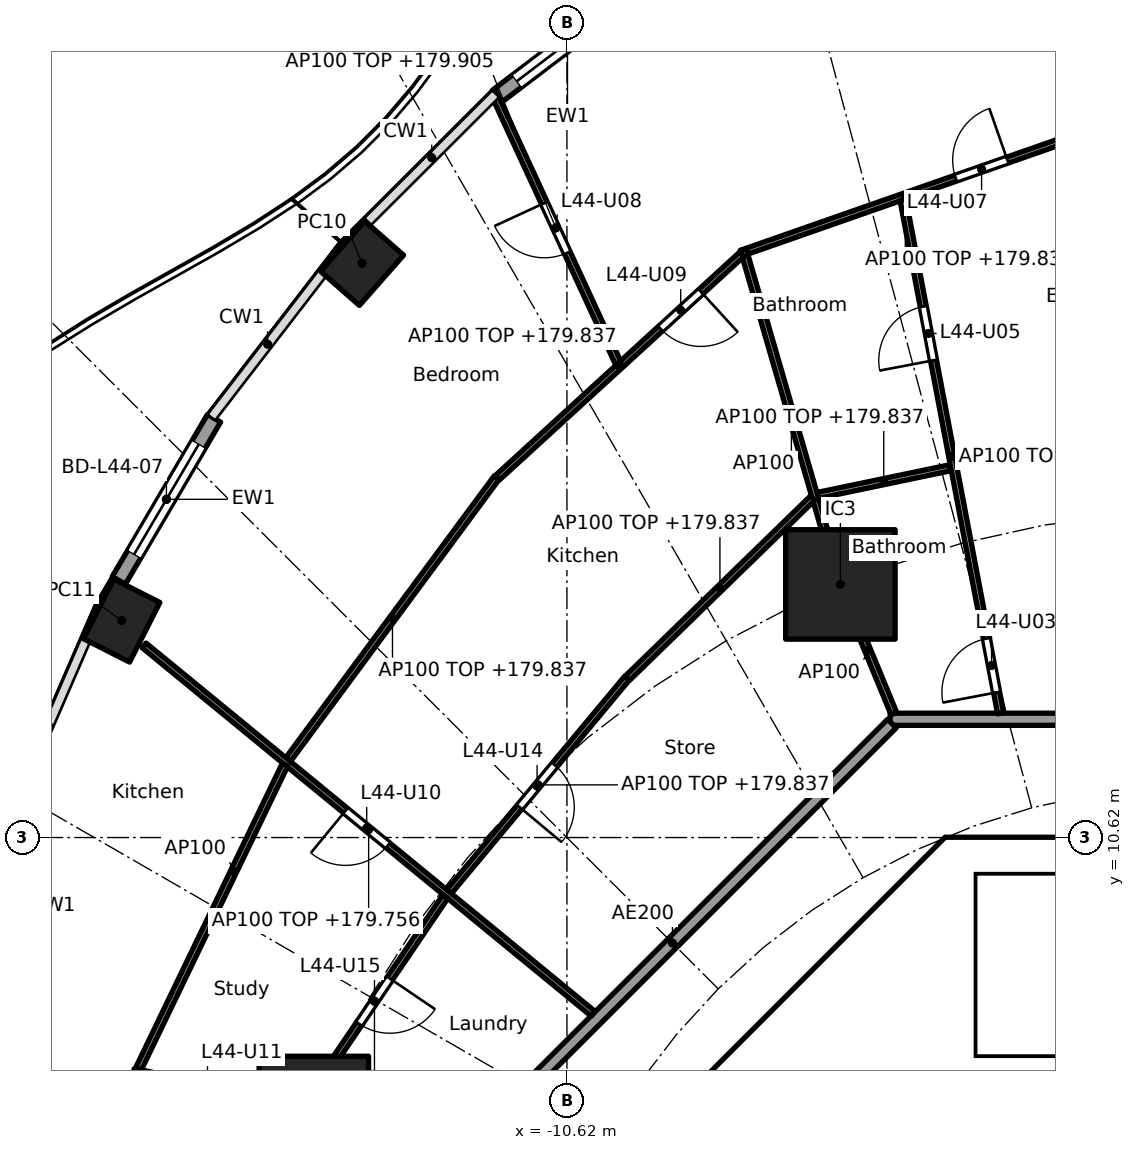
"""IFC4 building model, lengths in metres.
Left out: names, types, materials, properties, quantities, classifications, styles, units other than length and angle.
Written with IfcOpenShell. Run it as: python <this file> out.ifc"""

import sys

from ifc_helpers import new_model, si_unit, direction, frame, frame_2d, origin, origin_2d, place, context, subcontext, project, spatial, polyline, rectangle, hollow_rectangle, outline, extrude, element, fill, save


model = new_model("IFC4")
c1 = context("Model", 3, precision=1e-05, world=origin(), true_north=direction((0.0, 1.0)))
c2 = subcontext(c1, "Body", "Model", "MODEL_VIEW")
j1 = project(units=[si_unit("LENGTHUNIT", "METRE"), si_unit("PLANEANGLEUNIT", "RADIAN")], contexts=[c1])
p1 = place(None, origin())
s1 = spatial("IfcSite", under=j1, at=p1, CompositionType="ELEMENT")
p2 = place(p1, origin())
s2 = spatial("IfcBuilding", under=s1, at=p2, CompositionType="ELEMENT")
p3 = place(p2, frame((0.0, 0.0, 177.0)))
s3 = spatial("IfcBuildingStorey", under=s2, at=p3, CompositionType="ELEMENT", Elevation=177.0)
for number, where, z_axis, x_axis in (
    (1, (-13.989, 20.064, 0.0), (0.0, 0.0, 1.0), (-0.66, -0.751, 0.0)),
    (2, (-17.942, 14.188, 0.0), (0.0, 0.0, 1.0), (-0.452, -0.892, 0.0)),
):
    element("IfcColumn", number, at=place(p3, frame(where, z_axis=z_axis, x_axis=x_axis)), inside=s3, PredefinedType="COLUMN", context=c2, shape_type="SweptSolid", body=[
        extrude(hollow_rectangle(XDim=1.1, YDim=0.85, WallThickness=0.036, at=origin_2d()), origin(), (0.0, 0.0, 1.0), 3.7),
    ])
for number, where, z_axis, x_axis in (
    (3, (-6.123, 14.782, 0.0), (0.0, 0.0, 1.0), (1.0, 0.0, 0.0)),
    (4, (-14.782, 6.123, 0.0), (0.0, 0.0, 1.0), (1.0, 0.0, 0.0)),
):
    element("IfcColumn", number, at=place(p3, frame(where, z_axis=z_axis, x_axis=x_axis)), inside=s3, PredefinedType="COLUMN", context=c2, shape_type="SweptSolid", body=[
        extrude(rectangle(XDim=1.8, YDim=1.8, at=origin_2d()), origin(), (0.0, 0.0, 1.0), 3.7),
    ])
p4 = place(p3, frame((-11.772, 22.809, 0.0), z_axis=(0.0, 0.0, 1.0), x_axis=(0.796055733703, 0.60522332146, 0.0)))
e5 = element("IfcWall", 5, at=p4, inside=s3, PredefinedType="SOLIDWALL", context=c2, shape_type="SweptSolid", body=[
    extrude(rectangle(XDim=2.917, YDim=0.25, at=frame_2d((1.458, 0.0))), origin(), (0.0, 0.0, 1.0), 3.44),
])
p5 = place(p4, frame((0.408, 0.0, 0.0)))
e6 = element("IfcOpeningElement", 6, at=p5, cuts=e5, PredefinedType="OPENING", context=c2, shape_type="SweptSolid", body=[
    extrude(rectangle(XDim=2.1, YDim=2.4, at=frame_2d((1.05, 1.2))), frame((0.0, 0.135, 0.0), z_axis=(0.0, -1.0, 0.0), x_axis=(1.0, 0.0, 0.0)), (0.0, 0.0, 1.0), 0.27),
])
p6 = place(p3, frame((-17.989, 14.848, 0.0), z_axis=(0.0, 0.0, 1.0), x_axis=(0.506309086483, 0.862352079458, 0.0)))
e7 = element("IfcWall", 7, at=p6, inside=s3, PredefinedType="SOLIDWALL", context=c2, shape_type="SweptSolid", body=[
    extrude(rectangle(XDim=3.092, YDim=0.25, at=frame_2d((1.546, 0.0))), origin(), (0.0, 0.0, 1.0), 3.44),
])
p7 = place(p6, frame((0.496, 0.0, 0.0)))
e8 = element("IfcOpeningElement", 8, at=p7, cuts=e7, PredefinedType="OPENING", context=c2, shape_type="SweptSolid", body=[
    extrude(rectangle(XDim=2.1, YDim=2.4, at=frame_2d((1.05, 1.2))), frame((0.0, 0.135, 0.0), z_axis=(0.0, -1.0, 0.0), x_axis=(1.0, 0.0, 0.0)), (0.0, 0.0, 1.0), 0.27),
])
p8 = place(p3, frame((-4.613, 9.988, 0.0), z_axis=(0.0, 0.0, 1.0), x_axis=(-0.707106781187, -0.707106781187, 0.0)))
e9 = element("IfcWall", 9, at=p8, inside=s3, PredefinedType="SHEAR", context=c2, shape_type="SweptSolid", body=[
    extrude(rectangle(XDim=7.602, YDim=0.6, at=frame_2d((3.801, 0.0))), origin(), (0.0, 0.0, 1.0), 3.44),
])
p9 = place(p8, frame((0.351, 0.0, 0.0)))
e10 = element("IfcOpeningElement", 10, at=p9, cuts=e9, PredefinedType="OPENING", context=c2, shape_type="SweptSolid", body=[
    extrude(rectangle(XDim=1.1, YDim=2.1, at=frame_2d((0.55, 1.05))), frame((0.0, 0.31, 0.0), z_axis=(0.0, -1.0, 0.0), x_axis=(1.0, 0.0, 0.0)), (0.0, 0.0, 1.0), 0.62),
])
p10 = place(p3, frame((-5.8, 4.3, 0.0), z_axis=(0.0, 0.0, 1.0), x_axis=(0.0, 1.0, 0.0)))
e11 = element("IfcWall", 11, at=p10, inside=s3, PredefinedType="PARTITIONING", context=c2, shape_type="SweptSolid", body=[
    extrude(rectangle(XDim=3.927, YDim=0.15, at=frame_2d((1.963, 0.0))), origin(), (0.0, 0.0, 1.0), 3.44),
])
p11 = place(p10, frame((0.413, 0.0, 0.0)))
e12 = element("IfcOpeningElement", 12, at=p11, cuts=e11, PredefinedType="OPENING", context=c2, shape_type="SweptSolid", body=[
    extrude(rectangle(XDim=0.9, YDim=2.1, at=frame_2d((0.45, 1.05))), frame((0.0, 0.085, 0.0), z_axis=(0.0, -1.0, 0.0), x_axis=(1.0, 0.0, 0.0)), (0.0, 0.0, 1.0), 0.17),
])
p12 = place(p10, frame((2.489, 0.0, 0.0)))
e13 = element("IfcOpeningElement", 13, at=p12, cuts=e11, PredefinedType="OPENING", context=c2, shape_type="SweptSolid", body=[
    extrude(rectangle(XDim=0.9, YDim=2.1, at=frame_2d((0.45, 1.05))), frame((0.0, 0.085, 0.0), z_axis=(0.0, -1.0, 0.0), x_axis=(1.0, 0.0, 0.0)), (0.0, 0.0, 1.0), 0.17),
])
p13 = place(p3, origin())
e14 = element("IfcWall", 14, at=p13, inside=s3, PredefinedType="SHEAR", context=c2, shape_type="SweptSolid", body=[
    extrude(outline(polyline([(-4.152, 10.025), (-4.401, 9.776), (-4.825, 10.2), (-4.401, 10.625), (4.401, 10.625), (4.825, 10.2), (4.401, 9.776), (4.152, 10.025), (-4.152, 10.025)])), origin(), (0.0, 0.0, 1.0), 3.44),
])
p14 = place(p3, origin())
e15 = element("IfcWall", 15, at=p14, inside=s3, PredefinedType="SOLIDWALL", context=c2, shape_type="SweptSolid", body=[
    extrude(outline(polyline([(-3.9, 7.025), (-4.1, 7.025), (-4.1, 10.025), (-3.9, 10.025), (-3.9, 7.025)])), origin(), (0.0, 0.0, 1.0), 3.44),
])
p15 = place(p3, origin())
e16 = element("IfcWall", 16, at=p15, inside=s3, PredefinedType="SOLIDWALL", context=c2, shape_type="SweptSolid", body=[
    extrude(outline(polyline([(4.1, 6.5), (-4.1, 6.5), (-4.1, 7.025), (4.1, 7.025), (4.1, 6.5)])), origin(), (0.0, 0.0, 1.0), 3.44),
])
p16 = place(p3, frame((5.104, 12.565, 0.0), z_axis=(0.0, 0.0, 1.0), x_axis=(-1.0, 0.0, 0.0)))
e17 = element("IfcWall", 17, at=p16, inside=s3, PredefinedType="PARTITIONING", context=c2, shape_type="SweptSolid", body=[
    extrude(rectangle(XDim=10.409, YDim=0.2, at=frame_2d((5.205, 0.0))), origin(), (0.0, 0.0, 1.0), 3.44),
])
p17 = place(p16, frame((6.339, 0.0, 0.0)))
e18 = element("IfcOpeningElement", 18, at=p17, cuts=e17, PredefinedType="OPENING", context=c2, shape_type="SweptSolid", body=[
    extrude(rectangle(XDim=1.0, YDim=2.1, at=frame_2d((0.5, 1.05))), frame((0.0, 0.11, 0.0), z_axis=(0.0, -1.0, 0.0), x_axis=(1.0, 0.0, 0.0)), (0.0, 0.0, 1.0), 0.22),
])
p18 = place(p3, frame((-5.275, 12.494, 0.0), z_axis=(0.0, 0.0, 1.0), x_axis=(-0.707106781187, -0.707106781187, 0.0)))
e19 = element("IfcWall", 19, at=p18, inside=s3, PredefinedType="PARTITIONING", context=c2, shape_type="SweptSolid", body=[
    extrude(rectangle(XDim=10.209, YDim=0.2, at=frame_2d((5.104, 0.0))), origin(), (0.0, 0.0, 1.0), 3.44),
])
p19 = place(p3, frame((-2.452, 22.083, 0.0), z_axis=(0.0, 0.0, 1.0), x_axis=(-0.943916289103, -0.330184856051, 0.0)))
e20 = element("IfcWall", 20, at=p19, inside=s3, PredefinedType="PARTITIONING", context=c2, shape_type="SweptSolid", body=[
    extrude(rectangle(XDim=5.517, YDim=0.1, at=frame_2d((2.759, 0.0))), origin(), (0.0, 0.0, 1.0), 2.837),
])
p20 = place(p19, frame((0.979, 0.0, 0.0)))
e21 = element("IfcOpeningElement", 21, at=p20, cuts=e20, PredefinedType="OPENING", context=c2, shape_type="SweptSolid", body=[
    extrude(rectangle(XDim=0.9, YDim=2.1, at=frame_2d((0.45, 1.05))), frame((0.0, 0.06, 0.0), z_axis=(0.0, -1.0, 0.0), x_axis=(1.0, 0.0, 0.0)), (0.0, 0.0, 1.0), 0.12),
])
p21 = place(p3, frame((-3.488, 12.663, 0.0), z_axis=(0.0, 0.0, 1.0), x_axis=(-0.186783185485, 0.982401161247, 0.0)))
e22 = element("IfcWall", 22, at=p21, inside=s3, PredefinedType="PARTITIONING", context=c2, shape_type="SweptSolid", body=[
    extrude(rectangle(XDim=8.595, YDim=0.1, at=frame_2d((4.298, 0.0))), origin(), (0.0, 0.0, 1.0), 2.756),
])
p22 = place(p21, frame((0.35, 0.0, 0.0)))
e23 = element("IfcOpeningElement", 23, at=p22, cuts=e22, PredefinedType="OPENING", context=c2, shape_type="SweptSolid", body=[
    extrude(rectangle(XDim=0.9, YDim=2.1, at=frame_2d((0.45, 1.05))), frame((0.0, 0.06, 0.0), z_axis=(0.0, -1.0, 0.0), x_axis=(1.0, 0.0, 0.0)), (0.0, 0.0, 1.0), 0.12),
])
p23 = place(p21, frame((5.908, 0.0, 0.0)))
e24 = element("IfcOpeningElement", 24, at=p23, cuts=e22, PredefinedType="OPENING", context=c2, shape_type="SweptSolid", body=[
    extrude(rectangle(XDim=0.9, YDim=2.1, at=frame_2d((0.45, 1.05))), frame((0.0, 0.06, 0.0), z_axis=(0.0, -1.0, 0.0), x_axis=(1.0, 0.0, 0.0)), (0.0, 0.0, 1.0), 0.12),
])
p24 = place(p3, frame((-4.324, 16.699, 0.0), z_axis=(0.0, 0.0, 1.0), x_axis=(-0.978908011866, -0.204301503432, 0.0)))
e25 = element("IfcWall", 25, at=p24, inside=s3, PredefinedType="PARTITIONING", context=c2, shape_type="SweptSolid", body=[
    extrude(rectangle(XDim=2.218, YDim=0.1, at=frame_2d((1.109, 0.0))), origin(), (0.0, 0.0, 1.0), 2.837),
])
p25 = place(p3, frame((-5.243, 12.657, 0.0), z_axis=(0.0, 0.0, 1.0), x_axis=(-0.382719158442, 0.923864733477, 0.0)))
e26 = element("IfcWall", 26, at=p25, inside=s3, PredefinedType="PARTITIONING", context=c2, shape_type="SweptSolid", body=[
    extrude(rectangle(XDim=2.25, YDim=0.1, at=frame_2d((1.125, 0.0))), origin(), (0.0, 0.0, 1.0), 3.44),
])
p26 = place(p3, frame((-6.137, 14.83, 0.0), z_axis=(0.0, 0.0, 1.0), x_axis=(-0.278471793245, 0.960444407744, 0.0)))
e27 = element("IfcWall", 27, at=p26, inside=s3, PredefinedType="PARTITIONING", context=c2, shape_type="SweptSolid", body=[
    extrude(rectangle(XDim=5.688, YDim=0.1, at=frame_2d((2.844, 0.0))), origin(), (0.0, 0.0, 1.0), 3.44),
])
p27 = place(p3, frame((-6.58, 16.201, 0.0), z_axis=(0.0, 0.0, 1.0), x_axis=(-0.716946269374, -0.697128429223, 0.0)))
e28 = element("IfcWall", 28, at=p27, inside=s3, PredefinedType="PARTITIONING", context=c2, shape_type="SweptSolid", body=[
    extrude(rectangle(XDim=4.25, YDim=0.1, at=frame_2d((2.125, 0.0))), origin(), (0.0, 0.0, 1.0), 2.837),
])
p28 = place(p3, frame((-7.744, 20.212, 0.0), z_axis=(0.0, 0.0, 1.0), x_axis=(-0.738051761282, -0.674744097913, 0.0)))
e29 = element("IfcWall", 29, at=p28, inside=s3, PredefinedType="PARTITIONING", context=c2, shape_type="SweptSolid", body=[
    extrude(rectangle(XDim=5.449, YDim=0.1, at=frame_2d((2.725, 0.0))), origin(), (0.0, 0.0, 1.0), 2.837),
])
p29 = place(p28, frame((0.912, 0.0, 0.0)))
e30 = element("IfcOpeningElement", 30, at=p29, cuts=e29, PredefinedType="OPENING", context=c2, shape_type="SweptSolid", body=[
    extrude(rectangle(XDim=0.9, YDim=2.1, at=frame_2d((0.45, 1.05))), frame((0.0, 0.06, 0.0), z_axis=(0.0, -1.0, 0.0), x_axis=(1.0, 0.0, 0.0)), (0.0, 0.0, 1.0), 0.12),
])
p30 = place(p3, frame((-9.776, 18.419, 0.0), z_axis=(0.0, 0.0, 1.0), x_axis=(-0.418998197727, 0.907987065052, 0.0)))
e31 = element("IfcWall", 31, at=p30, inside=s3, PredefinedType="PARTITIONING", context=c2, shape_type="SweptSolid", body=[
    extrude(rectangle(XDim=4.904, YDim=0.1, at=frame_2d((2.452, 0.0))), origin(), (0.0, 0.0, 1.0), 2.905),
])
p31 = place(p30, frame((2.002, 0.0, 0.0)))
e32 = element("IfcOpeningElement", 32, at=p31, cuts=e31, PredefinedType="OPENING", context=c2, shape_type="SweptSolid", body=[
    extrude(rectangle(XDim=0.9, YDim=2.1, at=frame_2d((0.45, 1.05))), frame((0.0, 0.06, 0.0), z_axis=(0.0, -1.0, 0.0), x_axis=(1.0, 0.0, 0.0)), (0.0, 0.0, 1.0), 0.12),
])
p32 = place(p3, frame((-9.631, 13.242, 0.0), z_axis=(0.0, 0.0, 1.0), x_axis=(-0.640315711982, -0.768111833647, 0.0)))
e33 = element("IfcWall", 33, at=p32, inside=s3, PredefinedType="PARTITIONING", context=c2, shape_type="SweptSolid", body=[
    extrude(rectangle(XDim=4.572, YDim=0.1, at=frame_2d((2.286, 0.0))), origin(), (0.0, 0.0, 1.0), 2.837),
])
p33 = place(p32, frame((1.861, 0.0, 0.0)))
e34 = element("IfcOpeningElement", 34, at=p33, cuts=e33, PredefinedType="OPENING", context=c2, shape_type="SweptSolid", body=[
    extrude(rectangle(XDim=0.9, YDim=2.1, at=frame_2d((0.45, 1.05))), frame((0.0, 0.06, 0.0), z_axis=(0.0, -1.0, 0.0), x_axis=(1.0, 0.0, 0.0)), (0.0, 0.0, 1.0), 0.12),
])
p34 = place(p3, frame((-11.773, 16.542, 0.0), z_axis=(0.0, 0.0, 1.0), x_axis=(-0.594694305999, -0.803951915485, 0.0)))
e35 = element("IfcWall", 35, at=p34, inside=s3, PredefinedType="PARTITIONING", context=c2, shape_type="SweptSolid", body=[
    extrude(rectangle(XDim=5.772, YDim=0.1, at=frame_2d((2.886, 0.0))), origin(), (0.0, 0.0, 1.0), 2.837),
])
p35 = place(p3, frame((-10.189, 7.721, 0.0), z_axis=(0.0, 0.0, 1.0), x_axis=(-0.773134429339, 0.634242188892, 0.0)))
e36 = element("IfcWall", 36, at=p35, inside=s3, PredefinedType="PARTITIONING", context=c2, shape_type="SweptSolid", body=[
    extrude(rectangle(XDim=9.552, YDim=0.1, at=frame_2d((4.776, 0.0))), origin(), (0.0, 0.0, 1.0), 2.756),
])
p36 = place(p35, frame((4.367, 0.0, 0.0)))
e37 = element("IfcOpeningElement", 37, at=p36, cuts=e36, PredefinedType="OPENING", context=c2, shape_type="SweptSolid", body=[
    extrude(rectangle(XDim=0.9, YDim=2.1, at=frame_2d((0.45, 1.05))), frame((0.0, 0.06, 0.0), z_axis=(0.0, -1.0, 0.0), x_axis=(1.0, 0.0, 0.0)), (0.0, 0.0, 1.0), 0.12),
])
p37 = place(p3, frame((-12.619, 9.65, 0.0), z_axis=(0.0, 0.0, 1.0), x_axis=(-0.561064907171, -0.827771810308, 0.0)))
e38 = element("IfcWall", 38, at=p37, inside=s3, PredefinedType="PARTITIONING", context=c2, shape_type="SweptSolid", body=[
    extrude(rectangle(XDim=4.159, YDim=0.1, at=frame_2d((2.079, 0.0))), origin(), (0.0, 0.0, 1.0), 3.44),
])
p38 = place(p37, frame((1.629, 0.0, 0.0)))
e39 = element("IfcOpeningElement", 39, at=p38, cuts=e38, PredefinedType="OPENING", context=c2, shape_type="SweptSolid", body=[
    extrude(rectangle(XDim=0.9, YDim=2.1, at=frame_2d((0.45, 1.05))), frame((0.0, 0.06, 0.0), z_axis=(0.0, -1.0, 0.0), x_axis=(1.0, 0.0, 0.0)), (0.0, 0.0, 1.0), 0.12),
])
p39 = place(p3, frame((-15.257, 11.816, 0.0), z_axis=(0.0, 0.0, 1.0), x_axis=(-0.434040130629, -0.900893536997, 0.0)))
e40 = element("IfcWall", 40, at=p39, inside=s3, PredefinedType="PARTITIONING", context=c2, shape_type="SweptSolid", body=[
    extrude(rectangle(XDim=5.558, YDim=0.1, at=frame_2d((2.779, 0.0))), origin(), (0.0, 0.0, 1.0), 3.44),
])
p40 = place(p3, frame((-14.831, 6.134, 0.0), z_axis=(0.0, 0.0, 1.0), x_axis=(-0.976560749847, 0.215241961191, 0.0)))
e41 = element("IfcWall", 41, at=p40, inside=s3, PredefinedType="PARTITIONING", context=c2, shape_type="SweptSolid", body=[
    extrude(rectangle(XDim=2.879, YDim=0.1, at=frame_2d((1.439, 0.0))), origin(), (0.0, 0.0, 1.0), 3.44),
])
p41 = place(p40, frame((1.291, 0.0, 0.0)))
e42 = element("IfcOpeningElement", 42, at=p41, cuts=e41, PredefinedType="OPENING", context=c2, shape_type="SweptSolid", body=[
    extrude(rectangle(XDim=0.9, YDim=2.1, at=frame_2d((0.45, 1.05))), frame((0.0, 0.06, 0.0), z_axis=(0.0, -1.0, 0.0), x_axis=(1.0, 0.0, 0.0)), (0.0, 0.0, 1.0), 0.12),
])
p42 = place(p3, frame((-17.687, 6.814, 0.0), z_axis=(0.0, 0.0, 1.0), x_axis=(-0.086010249709, -0.996294252189, 0.0)))
e43 = element("IfcWall", 43, at=p42, inside=s3, PredefinedType="PARTITIONING", context=c2, shape_type="SweptSolid", body=[
    extrude(rectangle(XDim=6.889, YDim=0.1, at=frame_2d((3.445, 0.0))), origin(), (0.0, 0.0, 1.0), 2.837),
])
p43 = place(p42, frame((1.297, 0.0, 0.0)))
e44 = element("IfcOpeningElement", 44, at=p43, cuts=e43, PredefinedType="OPENING", context=c2, shape_type="SweptSolid", body=[
    extrude(rectangle(XDim=0.9, YDim=2.1, at=frame_2d((0.45, 1.05))), frame((0.0, 0.06, 0.0), z_axis=(0.0, -1.0, 0.0), x_axis=(1.0, 0.0, 0.0)), (0.0, 0.0, 1.0), 0.12),
])
p44 = place(p5, origin())
e45 = element("IfcDoor", 45, at=p44, inside=s3, OperationType="SLIDING_TO_LEFT", PredefinedType="DOOR", context=c2, shape_type="SweptSolid", body=[
    extrude(rectangle(XDim=2.1, YDim=2.4, at=frame_2d((1.05, 1.2))), frame((0.0, 0.025, 0.0), z_axis=(0.0, -1.0, 0.0), x_axis=(1.0, 0.0, 0.0)), (0.0, 0.0, 1.0), 0.05),
])
fill(e6, e45)
p45 = place(p7, origin())
e46 = element("IfcDoor", 46, at=p45, inside=s3, OperationType="SLIDING_TO_LEFT", PredefinedType="DOOR", context=c2, shape_type="SweptSolid", body=[
    extrude(rectangle(XDim=2.1, YDim=2.4, at=frame_2d((1.05, 1.2))), frame((0.0, 0.025, 0.0), z_axis=(0.0, -1.0, 0.0), x_axis=(1.0, 0.0, 0.0)), (0.0, 0.0, 1.0), 0.05),
])
fill(e8, e46)
p46 = place(p12, origin())
e47 = element("IfcDoor", 47, at=p46, inside=s3, OperationType="SINGLE_SWING_LEFT", PredefinedType="DOOR", context=c2, shape_type="SweptSolid", body=[
    extrude(rectangle(XDim=0.9, YDim=2.1, at=frame_2d((0.45, 1.05))), frame((0.0, 0.025, 0.0), z_axis=(0.0, -1.0, 0.0), x_axis=(1.0, 0.0, 0.0)), (0.0, 0.0, 1.0), 0.05),
])
fill(e13, e47)
p47 = place(p9, origin())
e48 = element("IfcDoor", 48, at=p47, inside=s3, OperationType="SINGLE_SWING_LEFT", PredefinedType="DOOR", context=c2, shape_type="SweptSolid", body=[
    extrude(rectangle(XDim=1.1, YDim=2.1, at=frame_2d((0.55, 1.05))), frame((0.0, 0.025, 0.0), z_axis=(0.0, -1.0, 0.0), x_axis=(1.0, 0.0, 0.0)), (0.0, 0.0, 1.0), 0.05),
])
fill(e10, e48)
p48 = place(p22, origin())
e49 = element("IfcDoor", 49, at=p48, inside=s3, OperationType="SINGLE_SWING_LEFT", PredefinedType="DOOR", context=c2, shape_type="SweptSolid", body=[
    extrude(rectangle(XDim=0.9, YDim=2.1, at=frame_2d((0.45, 1.05))), frame((0.0, 0.025, 0.0), z_axis=(0.0, -1.0, 0.0), x_axis=(1.0, 0.0, 0.0)), (0.0, 0.0, 1.0), 0.05),
])
fill(e23, e49)
p49 = place(p23, origin())
e50 = element("IfcDoor", 50, at=p49, inside=s3, OperationType="SINGLE_SWING_LEFT", PredefinedType="DOOR", context=c2, shape_type="SweptSolid", body=[
    extrude(rectangle(XDim=0.9, YDim=2.1, at=frame_2d((0.45, 1.05))), frame((0.0, 0.025, 0.0), z_axis=(0.0, -1.0, 0.0), x_axis=(1.0, 0.0, 0.0)), (0.0, 0.0, 1.0), 0.05),
])
fill(e24, e50)
p50 = place(p20, frame((0.9, 0.0, 0.0), x_axis=(-1.0, 0.0, 0.0)))
e51 = element("IfcDoor", 51, at=p50, inside=s3, OperationType="SINGLE_SWING_RIGHT", PredefinedType="DOOR", context=c2, shape_type="SweptSolid", body=[
    extrude(rectangle(XDim=0.9, YDim=2.1, at=frame_2d((0.45, 1.05))), frame((0.0, 0.025, 0.0), z_axis=(0.0, -1.0, 0.0), x_axis=(1.0, 0.0, 0.0)), (0.0, 0.0, 1.0), 0.05),
])
fill(e21, e51)
p51 = place(p31, origin())
e52 = element("IfcDoor", 52, at=p51, inside=s3, OperationType="SINGLE_SWING_RIGHT", PredefinedType="DOOR", context=c2, shape_type="SweptSolid", body=[
    extrude(rectangle(XDim=0.9, YDim=2.1, at=frame_2d((0.45, 1.05))), frame((0.0, 0.025, 0.0), z_axis=(0.0, -1.0, 0.0), x_axis=(1.0, 0.0, 0.0)), (0.0, 0.0, 1.0), 0.05),
])
fill(e32, e52)
p52 = place(p29, origin())
e53 = element("IfcDoor", 53, at=p52, inside=s3, OperationType="SINGLE_SWING_LEFT", PredefinedType="DOOR", context=c2, shape_type="SweptSolid", body=[
    extrude(rectangle(XDim=0.9, YDim=2.1, at=frame_2d((0.45, 1.05))), frame((0.0, 0.025, 0.0), z_axis=(0.0, -1.0, 0.0), x_axis=(1.0, 0.0, 0.0)), (0.0, 0.0, 1.0), 0.05),
])
fill(e30, e53)
p53 = place(p36, origin())
e54 = element("IfcDoor", 54, at=p53, inside=s3, OperationType="SINGLE_SWING_RIGHT", PredefinedType="DOOR", context=c2, shape_type="SweptSolid", body=[
    extrude(rectangle(XDim=0.9, YDim=2.1, at=frame_2d((0.45, 1.05))), frame((0.0, 0.025, 0.0), z_axis=(0.0, -1.0, 0.0), x_axis=(1.0, 0.0, 0.0)), (0.0, 0.0, 1.0), 0.05),
])
fill(e37, e54)
p54 = place(p33, origin())
e55 = element("IfcDoor", 55, at=p54, inside=s3, OperationType="SINGLE_SWING_RIGHT", PredefinedType="DOOR", context=c2, shape_type="SweptSolid", body=[
    extrude(rectangle(XDim=0.9, YDim=2.1, at=frame_2d((0.45, 1.05))), frame((0.0, 0.025, 0.0), z_axis=(0.0, -1.0, 0.0), x_axis=(1.0, 0.0, 0.0)), (0.0, 0.0, 1.0), 0.05),
])
fill(e34, e55)
p55 = place(p38, origin())
e56 = element("IfcDoor", 56, at=p55, inside=s3, OperationType="SINGLE_SWING_LEFT", PredefinedType="DOOR", context=c2, shape_type="SweptSolid", body=[
    extrude(rectangle(XDim=0.9, YDim=2.1, at=frame_2d((0.45, 1.05))), frame((0.0, 0.025, 0.0), z_axis=(0.0, -1.0, 0.0), x_axis=(1.0, 0.0, 0.0)), (0.0, 0.0, 1.0), 0.05),
])
fill(e39, e56)
save(model, sys.argv[1])
